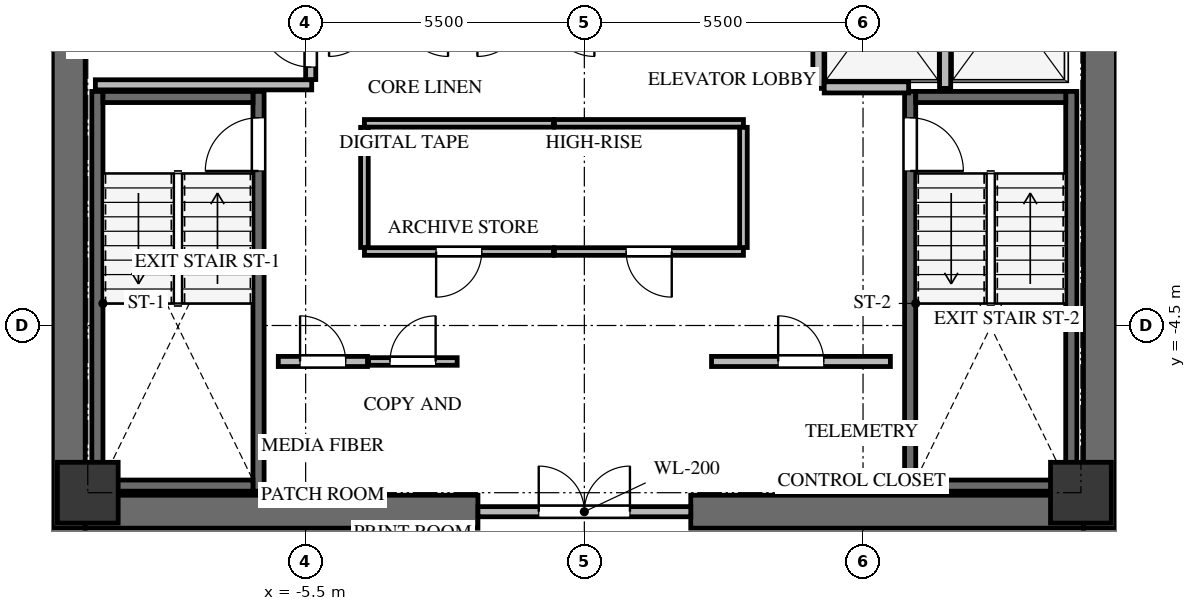
"""IFC4 building model, lengths in metres.
Left out: names, types, materials, properties, quantities, classifications, styles, units other than length and angle.
Written with IfcOpenShell. Run it as: python <this file> out.ifc"""

import sys

from ifc_helpers import new_model, si_unit, direction, frame, frame_2d, origin, origin_2d, place, context, subcontext, project, spatial, rectangle, extrude, source, transform, mapped, element, fill, save


model = new_model("IFC4")
c1 = context("Model", 3, precision=1e-05, world=origin(), true_north=direction((0.0, 1.0)))
c2 = subcontext(c1, "Body", "Model", "MODEL_VIEW")
j1 = project(units=[si_unit("LENGTHUNIT", "METRE"), si_unit("PLANEANGLEUNIT", "RADIAN")], contexts=[c1])
p1 = place(None, origin())
s1 = spatial("IfcSite", under=j1, at=p1, CompositionType="ELEMENT")
p2 = place(p1, origin())
s2 = spatial("IfcBuilding", under=s1, at=p2, CompositionType="ELEMENT")
p3 = place(p2, frame((0.0, 0.0, 193.6)))
s3 = spatial("IfcBuildingStorey", under=s2, at=p3, CompositionType="ELEMENT", Elevation=193.6)
for number, where, z_axis, x_axis in (
    (1, (-10.175, -8.5, 0.0), (0.0, 0.0, 1.0), (0.0, 1.0, 0.0)),
    (2, (10.175, -8.5, 0.0), (0.0, 0.0, 1.0), (0.0, 1.0, 0.0)),
):
    element("IfcWall", number, at=place(p3, frame(where, z_axis=z_axis, x_axis=x_axis)), inside=s3, PredefinedType="SHEAR", context=c2, shape_type="SweptSolid", body=[
        extrude(rectangle(XDim=17.0, YDim=0.65, at=frame_2d((8.5, 0.0))), origin(), (0.0, 0.0, 1.0), 3.3),
    ])
for number, where, z_axis, x_axis in (
    (3, (-9.85, -8.175, 0.0), (0.0, 0.0, 1.0), (1.0, 0.0, 0.0)),
    (4, (2.1, -8.175, 0.0), (0.0, 0.0, 1.0), (1.0, 0.0, 0.0)),
):
    element("IfcWall", number, at=place(p3, frame(where, z_axis=z_axis, x_axis=x_axis)), inside=s3, PredefinedType="SHEAR", context=c2, shape_type="SweptSolid", body=[
        extrude(rectangle(XDim=7.75, YDim=0.65, at=frame_2d((3.875, 0.0))), origin(), (0.0, 0.0, 1.0), 3.3),
    ])
p4 = place(p3, frame((-6.43, -7.77, -0.24), z_axis=(0.0, 0.0, 1.0), x_axis=(0.0, 1.0, 0.0)))
e5 = element("IfcWall", 5, at=p4, inside=s3, PredefinedType="SHEAR", context=c2, shape_type="SweptSolid", body=[
    extrude(rectangle(XDim=7.89, YDim=0.22, at=frame_2d((3.945, 0.0))), origin(), (0.0, 0.0, 1.0), 3.3),
])
p5 = place(p4, frame((6.32, 0.0, 0.0)))
e6 = element("IfcOpeningElement", 6, at=p5, cuts=e5, PredefinedType="OPENING", context=c2, shape_type="SweptSolid", body=[
    extrude(rectangle(XDim=1.05, YDim=2.15, at=frame_2d((0.525, 1.075))), frame((0.0, 0.12, 0.0), z_axis=(0.0, -1.0, 0.0), x_axis=(1.0, 0.0, 0.0)), (0.0, 0.0, 1.0), 0.24),
])
p6 = place(p3, frame((-9.61, 0.12, -0.24), z_axis=(0.0, 0.0, 1.0), x_axis=(0.0, -1.0, 0.0)))
e7 = element("IfcWall", 7, at=p6, inside=s3, PredefinedType="SHEAR", context=c2, shape_type="SweptSolid", body=[
    extrude(rectangle(XDim=7.89, YDim=0.22, at=frame_2d((3.945, 0.0))), origin(), (0.0, 0.0, 1.0), 3.3),
])
for number, where, z_axis, x_axis in (
    (8, (-9.5, -7.66, -0.24), (0.0, 0.0, 1.0), (1.0, 0.0, 0.0)),
    (9, (-6.54, 0.01, -0.24), (0.0, 0.0, 1.0), (-1.0, 0.0, 0.0)),
):
    element("IfcWall", number, at=place(p3, frame(where, z_axis=z_axis, x_axis=x_axis)), inside=s3, PredefinedType="SHEAR", context=c2, shape_type="SweptSolid", body=[
        extrude(rectangle(XDim=2.96, YDim=0.22, at=frame_2d((1.48, 0.0))), origin(), (0.0, 0.0, 1.0), 3.3),
    ])
p7 = place(p3, frame((9.61, -7.77, -0.24), z_axis=(0.0, 0.0, 1.0), x_axis=(0.0, 1.0, 0.0)))
e10 = element("IfcWall", 10, at=p7, inside=s3, PredefinedType="SHEAR", context=c2, shape_type="SweptSolid", body=[
    extrude(rectangle(XDim=7.89, YDim=0.22, at=frame_2d((3.945, 0.0))), origin(), (0.0, 0.0, 1.0), 3.3),
])
p8 = place(p3, frame((6.43, 0.12, -0.24), z_axis=(0.0, 0.0, 1.0), x_axis=(0.0, -1.0, 0.0)))
e11 = element("IfcWall", 11, at=p8, inside=s3, PredefinedType="SHEAR", context=c2, shape_type="SweptSolid", body=[
    extrude(rectangle(XDim=7.89, YDim=0.22, at=frame_2d((3.945, 0.0))), origin(), (0.0, 0.0, 1.0), 3.3),
])
p9 = place(p8, frame((0.52, 0.0, 0.0)))
e12 = element("IfcOpeningElement", 12, at=p9, cuts=e11, PredefinedType="OPENING", context=c2, shape_type="SweptSolid", body=[
    extrude(rectangle(XDim=1.05, YDim=2.15, at=frame_2d((0.525, 1.075))), frame((0.0, 0.12, 0.0), z_axis=(0.0, -1.0, 0.0), x_axis=(1.0, 0.0, 0.0)), (0.0, 0.0, 1.0), 0.24),
])
for number, where, z_axis, x_axis in (
    (13, (6.54, -7.66, -0.24), (0.0, 0.0, 1.0), (1.0, 0.0, 0.0)),
    (14, (9.5, 0.01, -0.24), (0.0, 0.0, 1.0), (-1.0, 0.0, 0.0)),
):
    element("IfcWall", number, at=place(p3, frame(where, z_axis=z_axis, x_axis=x_axis)), inside=s3, PredefinedType="SHEAR", context=c2, shape_type="SweptSolid", body=[
        extrude(rectangle(XDim=2.96, YDim=0.22, at=frame_2d((1.48, 0.0))), origin(), (0.0, 0.0, 1.0), 3.3),
    ])
m1 = source(origin(), c2, "Body", "SweptSolid", [
    extrude(rectangle(XDim=1.2, YDim=1.2, at=origin_2d()), origin(), (0.0, 0.0, 1.0), 3.3),
])
for number, where, z_axis, x_axis in (
    (15, (-9.8, -7.8, -0.24), (0.0, 0.0, 1.0), (1.0, 0.0, 0.0)),
    (16, (9.8, -7.8, -0.24), (0.0, 0.0, 1.0), (1.0, 0.0, 0.0)),
):
    element("IfcColumn", number, at=place(p3, frame(where, z_axis=z_axis, x_axis=x_axis)), inside=s3, PredefinedType="COLUMN", context=c2, shape_type="MappedRepresentation", body=[
        mapped(m1, transform((0.0, 0.0, 0.0), x_axis=(1.0, 0.0, 0.0), y_axis=(0.0, 1.0, 0.0), z_axis=(0.0, 0.0, 1.0), scale=1.0)),
    ])
p10 = place(p3, frame((-2.1, -8.175, 0.0), z_axis=(0.0, 0.0, 1.0), x_axis=(1.0, 0.0, 0.0)))
e17 = element("IfcWall", 17, at=p10, inside=s3, PredefinedType="SOLIDWALL", context=c2, shape_type="SweptSolid", body=[
    extrude(rectangle(XDim=4.2, YDim=0.2, at=frame_2d((2.1, 0.0))), origin(), (0.0, 0.0, 1.0), 3.045),
])
p11 = place(p10, frame((1.2, 0.0, 0.0)))
e18 = element("IfcOpeningElement", 18, at=p11, cuts=e17, PredefinedType="OPENING", context=c2, shape_type="SweptSolid", body=[
    extrude(rectangle(XDim=1.8, YDim=2.15, at=frame_2d((0.9, 1.075))), frame((0.0, 0.11, 0.0), z_axis=(0.0, -1.0, 0.0), x_axis=(1.0, 0.0, 0.0)), (0.0, 0.0, 1.0), 0.22),
])
p12 = place(p3, frame((-9.65, 0.25, 0.0), z_axis=(0.0, 0.0, 1.0), x_axis=(1.0, 0.0, 0.0)))
e19 = element("IfcWall", 19, at=p12, inside=s3, PredefinedType="SOLIDWALL", context=c2, shape_type="SweptSolid", body=[
    extrude(rectangle(XDim=4.27, YDim=0.2, at=frame_2d((2.135, 0.0))), origin(), (0.0, 0.0, 1.0), 3.045),
])
p13 = place(p3, frame((-5.4, 0.354, 0.0), z_axis=(0.0, 0.0, 1.0), x_axis=(0.0, 1.0, 0.0)))
e20 = element("IfcWall", 20, at=p13, inside=s3, PredefinedType="SOLIDWALL", context=c2, shape_type="SweptSolid", body=[
    extrude(rectangle(XDim=4.026, YDim=0.2, at=frame_2d((2.013, 0.0))), origin(), (0.0, 0.0, 1.0), 3.045),
])
p14 = place(p13, frame((0.246, 0.0, 0.0)))
e21 = element("IfcOpeningElement", 21, at=p14, cuts=e20, PredefinedType="OPENING", context=c2, shape_type="SweptSolid", body=[
    extrude(rectangle(XDim=1.0, YDim=2.15, at=frame_2d((0.5, 1.075))), frame((0.0, 0.11, 0.0), z_axis=(0.0, -1.0, 0.0), x_axis=(1.0, 0.0, 0.0)), (0.0, 0.0, 1.0), 0.22),
])
for number, where, z_axis, x_axis in (
    (22, (4.62, 0.18, 0.0), (0.0, 0.0, 1.0), (0.0, 1.0, 0.0)),
    (23, (7.12, 0.18, 0.0), (0.0, 0.0, 1.0), (0.0, 1.0, 0.0)),
):
    element("IfcWall", number, at=place(p3, frame(where, z_axis=z_axis, x_axis=x_axis)), inside=s3, PredefinedType="SOLIDWALL", context=c2, shape_type="SweptSolid", body=[
        extrude(rectangle(XDim=3.186, YDim=0.22, at=frame_2d((1.593, 0.0))), origin(), (0.0, 0.0, 1.0), 3.045),
    ])
p15 = place(p3, frame((4.734, 0.2, 0.0), z_axis=(0.0, 0.0, 1.0), x_axis=(1.0, 0.0, 0.0)))
e24 = element("IfcWall", 24, at=p15, inside=s3, PredefinedType="SOLIDWALL", context=c2, shape_type="SweptSolid", body=[
    extrude(rectangle(XDim=1.666, YDim=0.22, at=frame_2d((0.833, 0.0))), origin(), (0.0, 0.0, 1.0), 3.045),
])
p16 = place(p3, frame((-6.04, -5.21, 0.0), z_axis=(0.0, 0.0, 1.0), x_axis=(1.0, 0.0, 0.0)))
e25 = element("IfcWall", 25, at=p16, inside=s3, PredefinedType="SOLIDWALL", context=c2, shape_type="SweptSolid", body=[
    extrude(rectangle(XDim=1.76, YDim=0.2, at=frame_2d((0.88, 0.0))), origin(), (0.0, 0.0, 1.0), 3.045),
])
p17 = place(p16, frame((0.43, 0.0, 0.0)))
e26 = element("IfcOpeningElement", 26, at=p17, cuts=e25, PredefinedType="OPENING", context=c2, shape_type="SweptSolid", body=[
    extrude(rectangle(XDim=0.9, YDim=2.05, at=frame_2d((0.45, 1.025))), frame((0.0, 0.11, 0.0), z_axis=(0.0, -1.0, 0.0), x_axis=(1.0, 0.0, 0.0)), (0.0, 0.0, 1.0), 0.22),
])
p18 = place(p3, frame((-4.26, -5.21, 0.0), z_axis=(0.0, 0.0, 1.0), x_axis=(1.0, 0.0, 0.0)))
e27 = element("IfcWall", 27, at=p18, inside=s3, PredefinedType="PARTITIONING", context=c2, shape_type="SweptSolid", body=[
    extrude(rectangle(XDim=1.75, YDim=0.15, at=frame_2d((0.875, 0.0))), origin(), (0.0, 0.0, 1.0), 3.045),
])
p19 = place(p18, frame((0.425, 0.0, 0.0)))
e28 = element("IfcOpeningElement", 28, at=p19, cuts=e27, PredefinedType="OPENING", context=c2, shape_type="SweptSolid", body=[
    extrude(rectangle(XDim=0.9, YDim=2.05, at=frame_2d((0.45, 1.025))), frame((0.0, 0.085, 0.0), z_axis=(0.0, -1.0, 0.0), x_axis=(1.0, 0.0, 0.0)), (0.0, 0.0, 1.0), 0.17),
])
p20 = place(p3, frame((2.51, -5.21, 0.0), z_axis=(0.0, 0.0, 1.0), x_axis=(1.0, 0.0, 0.0)))
e29 = element("IfcWall", 29, at=p20, inside=s3, PredefinedType="SOLIDWALL", context=c2, shape_type="SweptSolid", body=[
    extrude(rectangle(XDim=3.53, YDim=0.2, at=frame_2d((1.765, 0.0))), origin(), (0.0, 0.0, 1.0), 3.045),
])
p21 = place(p20, frame((1.315, 0.0, 0.0)))
e30 = element("IfcOpeningElement", 30, at=p21, cuts=e29, PredefinedType="OPENING", context=c2, shape_type="SweptSolid", body=[
    extrude(rectangle(XDim=0.9, YDim=2.05, at=frame_2d((0.45, 1.025))), frame((0.0, 0.11, 0.0), z_axis=(0.0, -1.0, 0.0), x_axis=(1.0, 0.0, 0.0)), (0.0, 0.0, 1.0), 0.22),
])
p22 = place(p3, frame((-0.61, -3.04, 0.0), z_axis=(0.0, 0.0, 1.0), x_axis=(-1.0, 0.0, 0.0)))
e31 = element("IfcWall", 31, at=p22, inside=s3, PredefinedType="PARTITIONING", context=c2, shape_type="SweptSolid", body=[
    extrude(rectangle(XDim=3.73, YDim=0.15, at=frame_2d((1.865, 0.0))), origin(), (0.0, 0.0, 1.0), 3.045),
])
p23 = place(p22, frame((1.415, 0.0, 0.0)))
e32 = element("IfcOpeningElement", 32, at=p23, cuts=e31, PredefinedType="OPENING", context=c2, shape_type="SweptSolid", body=[
    extrude(rectangle(XDim=0.9, YDim=2.05, at=frame_2d((0.45, 1.025))), frame((0.0, 0.085, 0.0), z_axis=(0.0, -1.0, 0.0), x_axis=(1.0, 0.0, 0.0)), (0.0, 0.0, 1.0), 0.17),
])
p24 = place(p3, frame((-4.34, -0.51, 0.0), z_axis=(0.0, 0.0, 1.0), x_axis=(1.0, 0.0, 0.0)))
e33 = element("IfcWall", 33, at=p24, inside=s3, PredefinedType="PARTITIONING", context=c2, shape_type="SweptSolid", body=[
    extrude(rectangle(XDim=3.73, YDim=0.15, at=frame_2d((1.865, 0.0))), origin(), (0.0, 0.0, 1.0), 3.045),
])
p25 = place(p3, frame((-4.34, -2.961, 0.0), z_axis=(0.0, 0.0, 1.0), x_axis=(0.0, 1.0, 0.0)))
e34 = element("IfcWall", 34, at=p25, inside=s3, PredefinedType="PARTITIONING", context=c2, shape_type="SweptSolid", body=[
    extrude(rectangle(XDim=2.372, YDim=0.15, at=frame_2d((1.186, 0.0))), origin(), (0.0, 0.0, 1.0), 3.045),
])
p26 = place(p3, frame((3.14, -3.04, 0.0), z_axis=(0.0, 0.0, 1.0), x_axis=(-1.0, 0.0, 0.0)))
e35 = element("IfcWall", 35, at=p26, inside=s3, PredefinedType="PARTITIONING", context=c2, shape_type="SweptSolid", body=[
    extrude(rectangle(XDim=3.73, YDim=0.15, at=frame_2d((1.865, 0.0))), origin(), (0.0, 0.0, 1.0), 3.045),
])
p27 = place(p26, frame((1.415, 0.0, 0.0)))
e36 = element("IfcOpeningElement", 36, at=p27, cuts=e35, PredefinedType="OPENING", context=c2, shape_type="SweptSolid", body=[
    extrude(rectangle(XDim=0.9, YDim=2.05, at=frame_2d((0.45, 1.025))), frame((0.0, 0.085, 0.0), z_axis=(0.0, -1.0, 0.0), x_axis=(1.0, 0.0, 0.0)), (0.0, 0.0, 1.0), 0.17),
])
p28 = place(p3, frame((-0.59, -0.51, 0.0), z_axis=(0.0, 0.0, 1.0), x_axis=(1.0, 0.0, 0.0)))
e37 = element("IfcWall", 37, at=p28, inside=s3, PredefinedType="PARTITIONING", context=c2, shape_type="SweptSolid", body=[
    extrude(rectangle(XDim=3.73, YDim=0.15, at=frame_2d((1.865, 0.0))), origin(), (0.0, 0.0, 1.0), 3.045),
])
p29 = place(p3, frame((3.14, -0.589, 0.0), z_axis=(0.0, 0.0, 1.0), x_axis=(0.0, -1.0, 0.0)))
e38 = element("IfcWall", 38, at=p29, inside=s3, PredefinedType="PARTITIONING", context=c2, shape_type="SweptSolid", body=[
    extrude(rectangle(XDim=2.372, YDim=0.15, at=frame_2d((1.186, 0.0))), origin(), (0.0, 0.0, 1.0), 3.045),
])
m2 = source(origin(), c2, "Body", "SweptSolid", [
    extrude(rectangle(XDim=1.05, YDim=2.15, at=frame_2d((0.525, 1.075))), frame((0.0, 0.025, 0.0), z_axis=(0.0, -1.0, 0.0), x_axis=(1.0, 0.0, 0.0)), (0.0, 0.0, 1.0), 0.05),
])
p30 = place(p5, origin())
e39 = element("IfcDoor", 39, at=p30, inside=s3, OperationType="SINGLE_SWING_LEFT", PredefinedType="DOOR", context=c2, shape_type="MappedRepresentation", body=[
    mapped(m2, transform((0.0, 0.0, 0.0), x_axis=(1.0, 0.0, 0.0), y_axis=(0.0, 1.0, 0.0), z_axis=(0.0, 0.0, 1.0), scale=1.0)),
])
fill(e6, e39)
m3 = source(origin(), c2, "Body", "SweptSolid", [
    extrude(rectangle(XDim=1.05, YDim=2.15, at=frame_2d((0.525, 1.075))), frame((0.0, 0.025, 0.0), z_axis=(0.0, -1.0, 0.0), x_axis=(1.0, 0.0, 0.0)), (0.0, 0.0, 1.0), 0.05),
])
p31 = place(p9, origin())
e40 = element("IfcDoor", 40, at=p31, inside=s3, OperationType="SINGLE_SWING_RIGHT", PredefinedType="DOOR", context=c2, shape_type="MappedRepresentation", body=[
    mapped(m3, transform((0.0, 0.0, 0.0), x_axis=(1.0, 0.0, 0.0), y_axis=(0.0, 1.0, 0.0), z_axis=(0.0, 0.0, 1.0), scale=1.0)),
])
fill(e12, e40)
m4 = source(origin(), c2, "Body", "SweptSolid", [
    extrude(rectangle(XDim=1.8, YDim=2.15, at=frame_2d((0.9, 1.075))), frame((0.0, 0.025, 0.0), z_axis=(0.0, -1.0, 0.0), x_axis=(1.0, 0.0, 0.0)), (0.0, 0.0, 1.0), 0.05),
])
p32 = place(p11, origin())
e41 = element("IfcDoor", 41, at=p32, inside=s3, OperationType="DOUBLE_DOOR_SINGLE_SWING", PredefinedType="DOOR", context=c2, shape_type="MappedRepresentation", body=[
    mapped(m4, transform((0.0, 0.0, 0.0), x_axis=(1.0, 0.0, 0.0), y_axis=(0.0, 1.0, 0.0), z_axis=(0.0, 0.0, 1.0), scale=1.0)),
])
fill(e18, e41)
m5 = source(origin(), c2, "Body", "SweptSolid", [
    extrude(rectangle(XDim=1.0, YDim=2.15, at=frame_2d((0.5, 1.075))), frame((0.0, 0.025, 0.0), z_axis=(0.0, -1.0, 0.0), x_axis=(1.0, 0.0, 0.0)), (0.0, 0.0, 1.0), 0.05),
])
p33 = place(p14, origin())
e42 = element("IfcDoor", 42, at=p33, inside=s3, OperationType="SINGLE_SWING_RIGHT", PredefinedType="DOOR", context=c2, shape_type="MappedRepresentation", body=[
    mapped(m5, transform((0.0, 0.0, 0.0), x_axis=(1.0, 0.0, 0.0), y_axis=(0.0, 1.0, 0.0), z_axis=(0.0, 0.0, 1.0), scale=1.0)),
])
fill(e21, e42)
m6 = source(origin(), c2, "Body", "SweptSolid", [
    extrude(rectangle(XDim=0.9, YDim=2.05, at=frame_2d((0.45, 1.025))), frame((0.0, 0.025, 0.0), z_axis=(0.0, -1.0, 0.0), x_axis=(1.0, 0.0, 0.0)), (0.0, 0.0, 1.0), 0.05),
])
p34 = place(p17, origin())
e43 = element("IfcDoor", 43, at=p34, inside=s3, OperationType="SINGLE_SWING_LEFT", PredefinedType="DOOR", context=c2, shape_type="MappedRepresentation", body=[
    mapped(m6, transform((0.0, 0.0, 0.0), x_axis=(1.0, 0.0, 0.0), y_axis=(0.0, 1.0, 0.0), z_axis=(0.0, 0.0, 1.0), scale=1.0)),
])
fill(e26, e43)
m7 = source(origin(), c2, "Body", "SweptSolid", [
    extrude(rectangle(XDim=0.9, YDim=2.05, at=frame_2d((0.45, 1.025))), frame((0.0, 0.025, 0.0), z_axis=(0.0, -1.0, 0.0), x_axis=(1.0, 0.0, 0.0)), (0.0, 0.0, 1.0), 0.05),
])
p35 = place(p19, origin())
e44 = element("IfcDoor", 44, at=p35, inside=s3, OperationType="SINGLE_SWING_RIGHT", PredefinedType="DOOR", context=c2, shape_type="MappedRepresentation", body=[
    mapped(m7, transform((0.0, 0.0, 0.0), x_axis=(1.0, 0.0, 0.0), y_axis=(0.0, 1.0, 0.0), z_axis=(0.0, 0.0, 1.0), scale=1.0)),
])
fill(e28, e44)
p36 = place(p21, origin())
e45 = element("IfcDoor", 45, at=p36, inside=s3, OperationType="SINGLE_SWING_LEFT", PredefinedType="DOOR", context=c2, shape_type="MappedRepresentation", body=[
    mapped(m6, transform((0.0, 0.0, 0.0), x_axis=(1.0, 0.0, 0.0), y_axis=(0.0, 1.0, 0.0), z_axis=(0.0, 0.0, 1.0), scale=1.0)),
])
fill(e30, e45)
p37 = place(p23, origin())
e46 = element("IfcDoor", 46, at=p37, inside=s3, OperationType="SINGLE_SWING_RIGHT", PredefinedType="DOOR", context=c2, shape_type="MappedRepresentation", body=[
    mapped(m7, transform((0.0, 0.0, 0.0), x_axis=(1.0, 0.0, 0.0), y_axis=(0.0, 1.0, 0.0), z_axis=(0.0, 0.0, 1.0), scale=1.0)),
])
fill(e32, e46)
p38 = place(p27, origin())
e47 = element("IfcDoor", 47, at=p38, inside=s3, OperationType="SINGLE_SWING_LEFT", PredefinedType="DOOR", context=c2, shape_type="MappedRepresentation", body=[
    mapped(m6, transform((0.0, 0.0, 0.0), x_axis=(1.0, 0.0, 0.0), y_axis=(0.0, 1.0, 0.0), z_axis=(0.0, 0.0, 1.0), scale=1.0)),
])
fill(e36, e47)
save(model, sys.argv[1])
